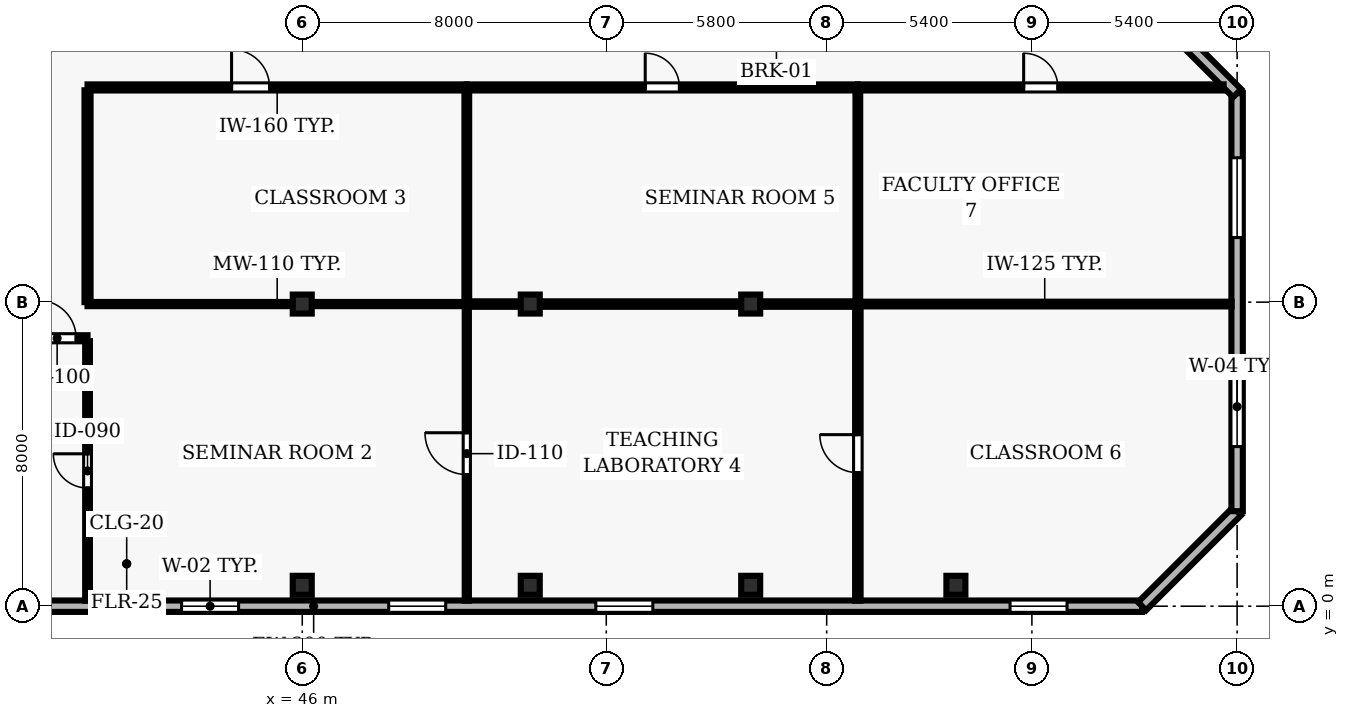
"""IFC4 building model, lengths in metres.
Left out: names, types, materials, properties, quantities, classifications, styles, units other than length and angle.
Written with IfcOpenShell. Run it as: python <this file> out.ifc"""

import sys

from ifc_helpers import new_model, si_unit, direction, frame, frame_2d, origin, origin_2d, place, context, subcontext, project, spatial, rectangle, hollow_rectangle, extrude, element, fill, save


model = new_model("IFC4")
c1 = context("Model", 3, precision=1e-05, world=origin(), true_north=direction((0.0, 1.0)))
c2 = subcontext(c1, "Body", "Model", "MODEL_VIEW")
j1 = project(units=[si_unit("LENGTHUNIT", "METRE"), si_unit("PLANEANGLEUNIT", "RADIAN")], contexts=[c1])
p1 = place(None, origin())
s1 = spatial("IfcSite", under=j1, at=p1, CompositionType="ELEMENT")
p2 = place(p1, origin())
s2 = spatial("IfcBuilding", under=s1, at=p2, CompositionType="ELEMENT")
p3 = place(p2, frame((0.0, 0.0, 107.3)))
s3 = spatial("IfcBuildingStorey", under=s2, at=p3, CompositionType="ELEMENT", Elevation=107.3)
for number, where, z_axis, x_axis in (
    (1, (46.0, 0.55, 0.0), (0.0, 0.0, 1.0), (1.0, 0.0, 0.0)),
    (2, (46.0, 7.95, 0.0), (0.0, 0.0, 1.0), (1.0, 0.0, 0.0)),
    (3, (52.0, 0.55, 0.0), (0.0, 0.0, 1.0), (1.0, 0.0, 0.0)),
    (4, (52.0, 7.95, 0.0), (0.0, 0.0, 1.0), (1.0, 0.0, 0.0)),
    (5, (57.8, 0.55, 0.0), (0.0, 0.0, 1.0), (1.0, 0.0, 0.0)),
    (6, (57.8, 7.95, 0.0), (0.0, 0.0, 1.0), (1.0, 0.0, 0.0)),
    (7, (63.2, 0.55, 0.0), (0.0, 0.0, 1.0), (1.0, 0.0, 0.0)),
):
    element("IfcColumn", number, at=place(p3, frame(where, z_axis=z_axis, x_axis=x_axis)), inside=s3, PredefinedType="COLUMN", context=c2, shape_type="SweptSolid", body=[
        extrude(hollow_rectangle(XDim=0.5, YDim=0.5, WallThickness=0.025, at=origin_2d()), origin(), (0.0, 0.0, 1.0), 3.9),
    ])
p4 = place(p3, frame((24.5, 0.0, 0.0), z_axis=(0.0, 0.0, 1.0), x_axis=(1.0, 0.0, 0.0)))
e8 = element("IfcWall", 8, at=p4, inside=s3, PredefinedType="SOLIDWALL", context=c2, shape_type="SweptSolid", body=[
    extrude(rectangle(XDim=43.6, YDim=0.3, at=frame_2d((21.8, 0.0))), origin(), (0.0, 0.0, 1.0), 3.69),
])
p5 = place(p4, frame((1.975, 0.0, 0.9)))
e9 = element("IfcOpeningElement", 9, at=p5, cuts=e8, PredefinedType="OPENING", context=c2, shape_type="SweptSolid", body=[
    extrude(rectangle(XDim=1.5, YDim=1.6, at=frame_2d((0.75, 0.8))), frame((0.0, 0.16, 0.0), z_axis=(0.0, -1.0, 0.0), x_axis=(1.0, 0.0, 0.0)), (0.0, 0.0, 1.0), 0.32),
])
p6 = place(p4, frame((8.325, 0.0, 0.9)))
e10 = element("IfcOpeningElement", 10, at=p6, cuts=e8, PredefinedType="OPENING", context=c2, shape_type="SweptSolid", body=[
    extrude(rectangle(XDim=1.5, YDim=1.6, at=frame_2d((0.75, 0.8))), frame((0.0, 0.16, 0.0), z_axis=(0.0, -1.0, 0.0), x_axis=(1.0, 0.0, 0.0)), (0.0, 0.0, 1.0), 0.32),
])
p7 = place(p4, frame((18.325, 0.0, 0.9)))
e11 = element("IfcOpeningElement", 11, at=p7, cuts=e8, PredefinedType="OPENING", context=c2, shape_type="SweptSolid", body=[
    extrude(rectangle(XDim=1.5, YDim=1.6, at=frame_2d((0.75, 0.8))), frame((0.0, 0.16, 0.0), z_axis=(0.0, -1.0, 0.0), x_axis=(1.0, 0.0, 0.0)), (0.0, 0.0, 1.0), 0.32),
])
p8 = place(p4, frame((23.775, 0.0, 0.9)))
e12 = element("IfcOpeningElement", 12, at=p8, cuts=e8, PredefinedType="OPENING", context=c2, shape_type="SweptSolid", body=[
    extrude(rectangle(XDim=1.5, YDim=1.6, at=frame_2d((0.75, 0.8))), frame((0.0, 0.16, 0.0), z_axis=(0.0, -1.0, 0.0), x_axis=(1.0, 0.0, 0.0)), (0.0, 0.0, 1.0), 0.32),
])
p9 = place(p4, frame((29.225, 0.0, 0.9)))
e13 = element("IfcOpeningElement", 13, at=p9, cuts=e8, PredefinedType="OPENING", context=c2, shape_type="SweptSolid", body=[
    extrude(rectangle(XDim=1.5, YDim=1.6, at=frame_2d((0.75, 0.8))), frame((0.0, 0.16, 0.0), z_axis=(0.0, -1.0, 0.0), x_axis=(1.0, 0.0, 0.0)), (0.0, 0.0, 1.0), 0.32),
])
p10 = place(p4, frame((40.125, 0.0, 0.9)))
e14 = element("IfcOpeningElement", 14, at=p10, cuts=e8, PredefinedType="OPENING", context=c2, shape_type="SweptSolid", body=[
    extrude(rectangle(XDim=1.5, YDim=1.6, at=frame_2d((0.75, 0.8))), frame((0.0, 0.16, 0.0), z_axis=(0.0, -1.0, 0.0), x_axis=(1.0, 0.0, 0.0)), (0.0, 0.0, 1.0), 0.32),
])
p11 = place(p3, frame((68.1, 0.0, 0.0), z_axis=(0.0, 0.0, 1.0), x_axis=(0.707106781187, 0.707106781187, 0.0)))
e15 = element("IfcWall", 15, at=p11, inside=s3, PredefinedType="SOLIDWALL", context=c2, shape_type="SweptSolid", body=[
    extrude(rectangle(XDim=3.536, YDim=0.3, at=frame_2d((1.768, 0.0))), origin(), (0.0, 0.0, 1.0), 3.69),
])
p12 = place(p3, frame((70.6, 2.5, 0.0), z_axis=(0.0, 0.0, 1.0), x_axis=(0.0, 1.0, 0.0)))
e16 = element("IfcWall", 16, at=p12, inside=s3, PredefinedType="SOLIDWALL", context=c2, shape_type="SweptSolid", body=[
    extrude(rectangle(XDim=11.0, YDim=0.3, at=frame_2d((5.5, 0.0))), origin(), (0.0, 0.0, 1.0), 3.69),
])
p13 = place(p12, frame((1.7, 0.0, 0.9)))
e17 = element("IfcOpeningElement", 17, at=p13, cuts=e16, PredefinedType="OPENING", context=c2, shape_type="SweptSolid", body=[
    extrude(rectangle(XDim=2.1, YDim=1.6, at=frame_2d((1.05, 0.8))), frame((0.0, 0.16, 0.0), z_axis=(0.0, -1.0, 0.0), x_axis=(1.0, 0.0, 0.0)), (0.0, 0.0, 1.0), 0.32),
])
p14 = place(p12, frame((7.2, 0.0, 0.9)))
e18 = element("IfcOpeningElement", 18, at=p14, cuts=e16, PredefinedType="OPENING", context=c2, shape_type="SweptSolid", body=[
    extrude(rectangle(XDim=2.1, YDim=1.6, at=frame_2d((1.05, 0.8))), frame((0.0, 0.16, 0.0), z_axis=(0.0, -1.0, 0.0), x_axis=(1.0, 0.0, 0.0)), (0.0, 0.0, 1.0), 0.32),
])
p15 = place(p3, frame((70.6, 13.5, 0.0), z_axis=(0.0, 0.0, 1.0), x_axis=(-0.707106781187, 0.707106781187, 0.0)))
e19 = element("IfcWall", 19, at=p15, inside=s3, PredefinedType="SOLIDWALL", context=c2, shape_type="SweptSolid", body=[
    extrude(rectangle(XDim=3.536, YDim=0.3, at=frame_2d((1.768, 0.0))), origin(), (0.0, 0.0, 1.0), 3.69),
])
p16 = place(p3, frame((38.05, 7.05, 0.0), z_axis=(0.0, 0.0, 1.0), x_axis=(1.0, 0.0, 0.0)))
e20 = element("IfcWall", 20, at=p16, inside=s3, PredefinedType="PARTITIONING", context=c2, shape_type="SweptSolid", body=[
    extrude(rectangle(XDim=2.3, YDim=0.16, at=frame_2d((1.15, 0.0))), origin(), (0.0, 0.0, 1.0), 3.69),
])
p17 = place(p16, frame((1.0, 0.0, 0.0)))
e21 = element("IfcOpeningElement", 21, at=p17, cuts=e20, PredefinedType="OPENING", context=c2, shape_type="SweptSolid", body=[
    extrude(rectangle(XDim=1.0, YDim=2.1, at=frame_2d((0.5, 1.05))), frame((0.0, 0.09, 0.0), z_axis=(0.0, -1.0, 0.0), x_axis=(1.0, 0.0, 0.0)), (0.0, 0.0, 1.0), 0.18),
])
p18 = place(p3, frame((40.35, 13.65, 0.0), z_axis=(0.0, 0.0, 1.0), x_axis=(1.0, 0.0, 0.0)))
e22 = element("IfcWall", 22, at=p18, inside=s3, PredefinedType="PARTITIONING", context=c2, shape_type="SweptSolid", body=[
    extrude(rectangle(XDim=9.98, YDim=0.16, at=frame_2d((4.99, 0.0))), origin(), (0.0, 0.0, 1.0), 3.69),
])
p19 = place(p18, frame((3.79, 0.0, 0.0)))
e23 = element("IfcOpeningElement", 23, at=p19, cuts=e22, PredefinedType="OPENING", context=c2, shape_type="SweptSolid", body=[
    extrude(rectangle(XDim=1.0, YDim=2.1, at=frame_2d((0.5, 1.05))), frame((0.0, 0.09, 0.0), z_axis=(0.0, -1.0, 0.0), x_axis=(1.0, 0.0, 0.0)), (0.0, 0.0, 1.0), 0.18),
])
p20 = place(p3, frame((50.33, 7.95, 0.0), z_axis=(0.0, 0.0, 1.0), x_axis=(-1.0, 0.0, 0.0)))
e24 = element("IfcWall", 24, at=p20, inside=s3, PredefinedType="MOVABLE", context=c2, shape_type="SweptSolid", body=[
    extrude(rectangle(XDim=9.98, YDim=0.11, at=frame_2d((4.99, 0.0))), origin(), (0.0, 0.0, 1.0), 3.073),
])
p21 = place(p3, frame((50.33, 13.65, 0.0), z_axis=(0.0, 0.0, 1.0), x_axis=(1.0, 0.0, 0.0)))
e25 = element("IfcWall", 25, at=p21, inside=s3, PredefinedType="PARTITIONING", context=c2, shape_type="SweptSolid", body=[
    extrude(rectangle(XDim=10.29, YDim=0.16, at=frame_2d((5.145, 0.0))), origin(), (0.0, 0.0, 1.0), 3.69),
])
p22 = place(p21, frame((4.695, 0.0, 0.0)))
e26 = element("IfcOpeningElement", 26, at=p22, cuts=e25, PredefinedType="OPENING", context=c2, shape_type="SweptSolid", body=[
    extrude(rectangle(XDim=0.9, YDim=2.1, at=frame_2d((0.45, 1.05))), frame((0.0, 0.09, 0.0), z_axis=(0.0, -1.0, 0.0), x_axis=(1.0, 0.0, 0.0)), (0.0, 0.0, 1.0), 0.18),
])
p23 = place(p3, frame((60.62, 7.95, 0.0), z_axis=(0.0, 0.0, 1.0), x_axis=(-1.0, 0.0, 0.0)))
e27 = element("IfcWall", 27, at=p23, inside=s3, PredefinedType="PARTITIONING", context=c2, shape_type="SweptSolid", body=[
    extrude(rectangle(XDim=10.29, YDim=0.145, at=frame_2d((5.145, 0.0))), origin(), (0.0, 0.0, 1.0), 3.073),
])
p24 = place(p3, frame((60.62, 13.65, 0.0), z_axis=(0.0, 0.0, 1.0), x_axis=(1.0, 0.0, 0.0)))
e28 = element("IfcWall", 28, at=p24, inside=s3, PredefinedType="PARTITIONING", context=c2, shape_type="SweptSolid", body=[
    extrude(rectangle(XDim=9.625, YDim=0.16, at=frame_2d((4.812, 0.0))), origin(), (0.0, 0.0, 1.0), 3.69),
])
p25 = place(p24, frame((4.363, 0.0, 0.0)))
e29 = element("IfcOpeningElement", 29, at=p25, cuts=e28, PredefinedType="OPENING", context=c2, shape_type="SweptSolid", body=[
    extrude(rectangle(XDim=0.9, YDim=2.1, at=frame_2d((0.45, 1.05))), frame((0.0, 0.09, 0.0), z_axis=(0.0, -1.0, 0.0), x_axis=(1.0, 0.0, 0.0)), (0.0, 0.0, 1.0), 0.18),
])
p26 = place(p3, frame((70.455, 7.95, 0.0), z_axis=(0.0, 0.0, 1.0), x_axis=(-1.0, 0.0, 0.0)))
e30 = element("IfcWall", 30, at=p26, inside=s3, PredefinedType="PARTITIONING", context=c2, shape_type="SweptSolid", body=[
    extrude(rectangle(XDim=9.835, YDim=0.125, at=frame_2d((4.917, 0.0))), origin(), (0.0, 0.0, 1.0), 3.69),
])
p27 = place(p3, frame((40.35, 0.145, 0.0), z_axis=(0.0, 0.0, 1.0), x_axis=(0.0, 1.0, 0.0)))
e31 = element("IfcWall", 31, at=p27, inside=s3, PredefinedType="PARTITIONING", context=c2, shape_type="SweptSolid", body=[
    extrude(rectangle(XDim=6.83, YDim=0.125, at=frame_2d((3.415, 0.0))), origin(), (0.0, 0.0, 1.0), 3.69),
])
p28 = place(p27, frame((2.965, 0.0, 0.0)))
e32 = element("IfcOpeningElement", 32, at=p28, cuts=e31, PredefinedType="OPENING", context=c2, shape_type="SweptSolid", body=[
    extrude(rectangle(XDim=0.9, YDim=2.1, at=frame_2d((0.45, 1.05))), frame((0.0, 0.073, 0.0), z_axis=(0.0, -1.0, 0.0), x_axis=(1.0, 0.0, 0.0)), (0.0, 0.0, 1.0), 0.145),
])
p29 = place(p3, frame((40.35, 8.0, 0.0), z_axis=(0.0, 0.0, 1.0), x_axis=(0.0, 1.0, 0.0)))
e33 = element("IfcWall", 33, at=p29, inside=s3, PredefinedType="PARTITIONING", context=c2, shape_type="SweptSolid", body=[
    extrude(rectangle(XDim=5.575, YDim=0.16, at=frame_2d((2.788, 0.0))), origin(), (0.0, 0.0, 1.0), 3.69),
])
p30 = place(p3, frame((50.33, 0.145, 0.0), z_axis=(0.0, 0.0, 1.0), x_axis=(0.0, 1.0, 0.0)))
e34 = element("IfcWall", 34, at=p30, inside=s3, PredefinedType="MOVABLE", context=c2, shape_type="SweptSolid", body=[
    extrude(rectangle(XDim=7.738, YDim=0.11, at=frame_2d((3.869, 0.0))), origin(), (0.0, 0.0, 1.0), 3.69),
])
p31 = place(p30, frame((3.319, 0.0, 0.0)))
e35 = element("IfcOpeningElement", 35, at=p31, cuts=e34, PredefinedType="OPENING", context=c2, shape_type="SweptSolid", body=[
    extrude(rectangle(XDim=1.1, YDim=2.15, at=frame_2d((0.55, 1.075))), frame((0.0, 0.065, 0.0), z_axis=(0.0, -1.0, 0.0), x_axis=(1.0, 0.0, 0.0)), (0.0, 0.0, 1.0), 0.13),
])
p32 = place(p3, frame((50.33, 8.018, 0.0), z_axis=(0.0, 0.0, 1.0), x_axis=(0.0, 1.0, 0.0)))
e36 = element("IfcWall", 36, at=p32, inside=s3, PredefinedType="PARTITIONING", context=c2, shape_type="SweptSolid", body=[
    extrude(rectangle(XDim=5.557, YDim=0.125, at=frame_2d((2.778, 0.0))), origin(), (0.0, 0.0, 1.0), 3.69),
])
p33 = place(p3, frame((60.62, 0.145, 0.0), z_axis=(0.0, 0.0, 1.0), x_axis=(0.0, 1.0, 0.0)))
e37 = element("IfcWall", 37, at=p33, inside=s3, PredefinedType="PARTITIONING", context=c2, shape_type="SweptSolid", body=[
    extrude(rectangle(XDim=7.738, YDim=0.145, at=frame_2d((3.869, 0.0))), origin(), (0.0, 0.0, 1.0), 3.69),
])
p34 = place(p33, frame((3.369, 0.0, 0.0)))
e38 = element("IfcOpeningElement", 38, at=p34, cuts=e37, PredefinedType="OPENING", context=c2, shape_type="SweptSolid", body=[
    extrude(rectangle(XDim=1.0, YDim=2.1, at=frame_2d((0.5, 1.05))), frame((0.0, 0.083, 0.0), z_axis=(0.0, -1.0, 0.0), x_axis=(1.0, 0.0, 0.0)), (0.0, 0.0, 1.0), 0.165),
])
p35 = place(p3, frame((60.62, 8.018, 0.0), z_axis=(0.0, 0.0, 1.0), x_axis=(0.0, 1.0, 0.0)))
e39 = element("IfcWall", 39, at=p35, inside=s3, PredefinedType="PARTITIONING", context=c2, shape_type="SweptSolid", body=[
    extrude(rectangle(XDim=5.557, YDim=0.125, at=frame_2d((2.778, 0.0))), origin(), (0.0, 0.0, 1.0), 3.69),
])
p36 = place(p7, origin())
e40 = element("IfcWindow", 40, at=p36, inside=s3, PartitioningType="SINGLE_PANEL", PredefinedType="WINDOW", context=c2, shape_type="SweptSolid", body=[
    extrude(rectangle(XDim=1.5, YDim=1.6, at=frame_2d((0.75, 0.8))), frame((0.0, 0.03, 0.0), z_axis=(0.0, -1.0, 0.0), x_axis=(1.0, 0.0, 0.0)), (0.0, 0.0, 1.0), 0.06),
])
fill(e11, e40)
p37 = place(p8, origin())
e41 = element("IfcWindow", 41, at=p37, inside=s3, PartitioningType="SINGLE_PANEL", PredefinedType="WINDOW", context=c2, shape_type="SweptSolid", body=[
    extrude(rectangle(XDim=1.5, YDim=1.6, at=frame_2d((0.75, 0.8))), frame((0.0, 0.03, 0.0), z_axis=(0.0, -1.0, 0.0), x_axis=(1.0, 0.0, 0.0)), (0.0, 0.0, 1.0), 0.06),
])
fill(e12, e41)
p38 = place(p9, origin())
e42 = element("IfcWindow", 42, at=p38, inside=s3, PartitioningType="SINGLE_PANEL", PredefinedType="WINDOW", context=c2, shape_type="SweptSolid", body=[
    extrude(rectangle(XDim=1.5, YDim=1.6, at=frame_2d((0.75, 0.8))), frame((0.0, 0.03, 0.0), z_axis=(0.0, -1.0, 0.0), x_axis=(1.0, 0.0, 0.0)), (0.0, 0.0, 1.0), 0.06),
])
fill(e13, e42)
p39 = place(p10, origin())
e43 = element("IfcWindow", 43, at=p39, inside=s3, PartitioningType="SINGLE_PANEL", PredefinedType="WINDOW", context=c2, shape_type="SweptSolid", body=[
    extrude(rectangle(XDim=1.5, YDim=1.6, at=frame_2d((0.75, 0.8))), frame((0.0, 0.03, 0.0), z_axis=(0.0, -1.0, 0.0), x_axis=(1.0, 0.0, 0.0)), (0.0, 0.0, 1.0), 0.06),
])
fill(e14, e43)
p40 = place(p13, origin())
e44 = element("IfcWindow", 44, at=p40, inside=s3, PartitioningType="SINGLE_PANEL", PredefinedType="WINDOW", context=c2, shape_type="SweptSolid", body=[
    extrude(rectangle(XDim=2.1, YDim=1.6, at=frame_2d((1.05, 0.8))), frame((0.0, 0.03, 0.0), z_axis=(0.0, -1.0, 0.0), x_axis=(1.0, 0.0, 0.0)), (0.0, 0.0, 1.0), 0.06),
])
fill(e17, e44)
p41 = place(p14, origin())
e45 = element("IfcWindow", 45, at=p41, inside=s3, PartitioningType="SINGLE_PANEL", PredefinedType="WINDOW", context=c2, shape_type="SweptSolid", body=[
    extrude(rectangle(XDim=2.1, YDim=1.6, at=frame_2d((1.05, 0.8))), frame((0.0, 0.03, 0.0), z_axis=(0.0, -1.0, 0.0), x_axis=(1.0, 0.0, 0.0)), (0.0, 0.0, 1.0), 0.06),
])
fill(e18, e45)
p42 = place(p17, origin())
e46 = element("IfcDoor", 46, at=p42, inside=s3, OperationType="SINGLE_SWING_LEFT", PredefinedType="DOOR", context=c2, shape_type="SweptSolid", body=[
    extrude(rectangle(XDim=1.0, YDim=2.1, at=frame_2d((0.5, 1.05))), frame((0.0, 0.025, 0.0), z_axis=(0.0, -1.0, 0.0), x_axis=(1.0, 0.0, 0.0)), (0.0, 0.0, 1.0), 0.05),
])
fill(e21, e46)
p43 = place(p28, origin())
e47 = element("IfcDoor", 47, at=p43, inside=s3, OperationType="SINGLE_SWING_RIGHT", PredefinedType="DOOR", context=c2, shape_type="SweptSolid", body=[
    extrude(rectangle(XDim=0.9, YDim=2.1, at=frame_2d((0.45, 1.05))), frame((0.0, 0.025, 0.0), z_axis=(0.0, -1.0, 0.0), x_axis=(1.0, 0.0, 0.0)), (0.0, 0.0, 1.0), 0.05),
])
fill(e32, e47)
p44 = place(p19, origin())
e48 = element("IfcDoor", 48, at=p44, inside=s3, OperationType="SINGLE_SWING_LEFT", PredefinedType="DOOR", context=c2, shape_type="SweptSolid", body=[
    extrude(rectangle(XDim=1.0, YDim=2.1, at=frame_2d((0.5, 1.05))), frame((0.0, 0.025, 0.0), z_axis=(0.0, -1.0, 0.0), x_axis=(1.0, 0.0, 0.0)), (0.0, 0.0, 1.0), 0.05),
])
fill(e23, e48)
p45 = place(p31, origin())
e49 = element("IfcDoor", 49, at=p45, inside=s3, OperationType="SINGLE_SWING_RIGHT", PredefinedType="DOOR", context=c2, shape_type="SweptSolid", body=[
    extrude(rectangle(XDim=1.1, YDim=2.15, at=frame_2d((0.55, 1.075))), frame((0.0, 0.025, 0.0), z_axis=(0.0, -1.0, 0.0), x_axis=(1.0, 0.0, 0.0)), (0.0, 0.0, 1.0), 0.05),
])
fill(e35, e49)
p46 = place(p22, origin())
e50 = element("IfcDoor", 50, at=p46, inside=s3, OperationType="SINGLE_SWING_LEFT", PredefinedType="DOOR", context=c2, shape_type="SweptSolid", body=[
    extrude(rectangle(XDim=0.9, YDim=2.1, at=frame_2d((0.45, 1.05))), frame((0.0, 0.025, 0.0), z_axis=(0.0, -1.0, 0.0), x_axis=(1.0, 0.0, 0.0)), (0.0, 0.0, 1.0), 0.05),
])
fill(e26, e50)
p47 = place(p34, origin())
e51 = element("IfcDoor", 51, at=p47, inside=s3, OperationType="SINGLE_SWING_RIGHT", PredefinedType="DOOR", context=c2, shape_type="SweptSolid", body=[
    extrude(rectangle(XDim=1.0, YDim=2.1, at=frame_2d((0.5, 1.05))), frame((0.0, 0.025, 0.0), z_axis=(0.0, -1.0, 0.0), x_axis=(1.0, 0.0, 0.0)), (0.0, 0.0, 1.0), 0.05),
])
fill(e38, e51)
p48 = place(p25, origin())
e52 = element("IfcDoor", 52, at=p48, inside=s3, OperationType="SINGLE_SWING_LEFT", PredefinedType="DOOR", context=c2, shape_type="SweptSolid", body=[
    extrude(rectangle(XDim=0.9, YDim=2.1, at=frame_2d((0.45, 1.05))), frame((0.0, 0.025, 0.0), z_axis=(0.0, -1.0, 0.0), x_axis=(1.0, 0.0, 0.0)), (0.0, 0.0, 1.0), 0.05),
])
fill(e29, e52)
save(model, sys.argv[1])
